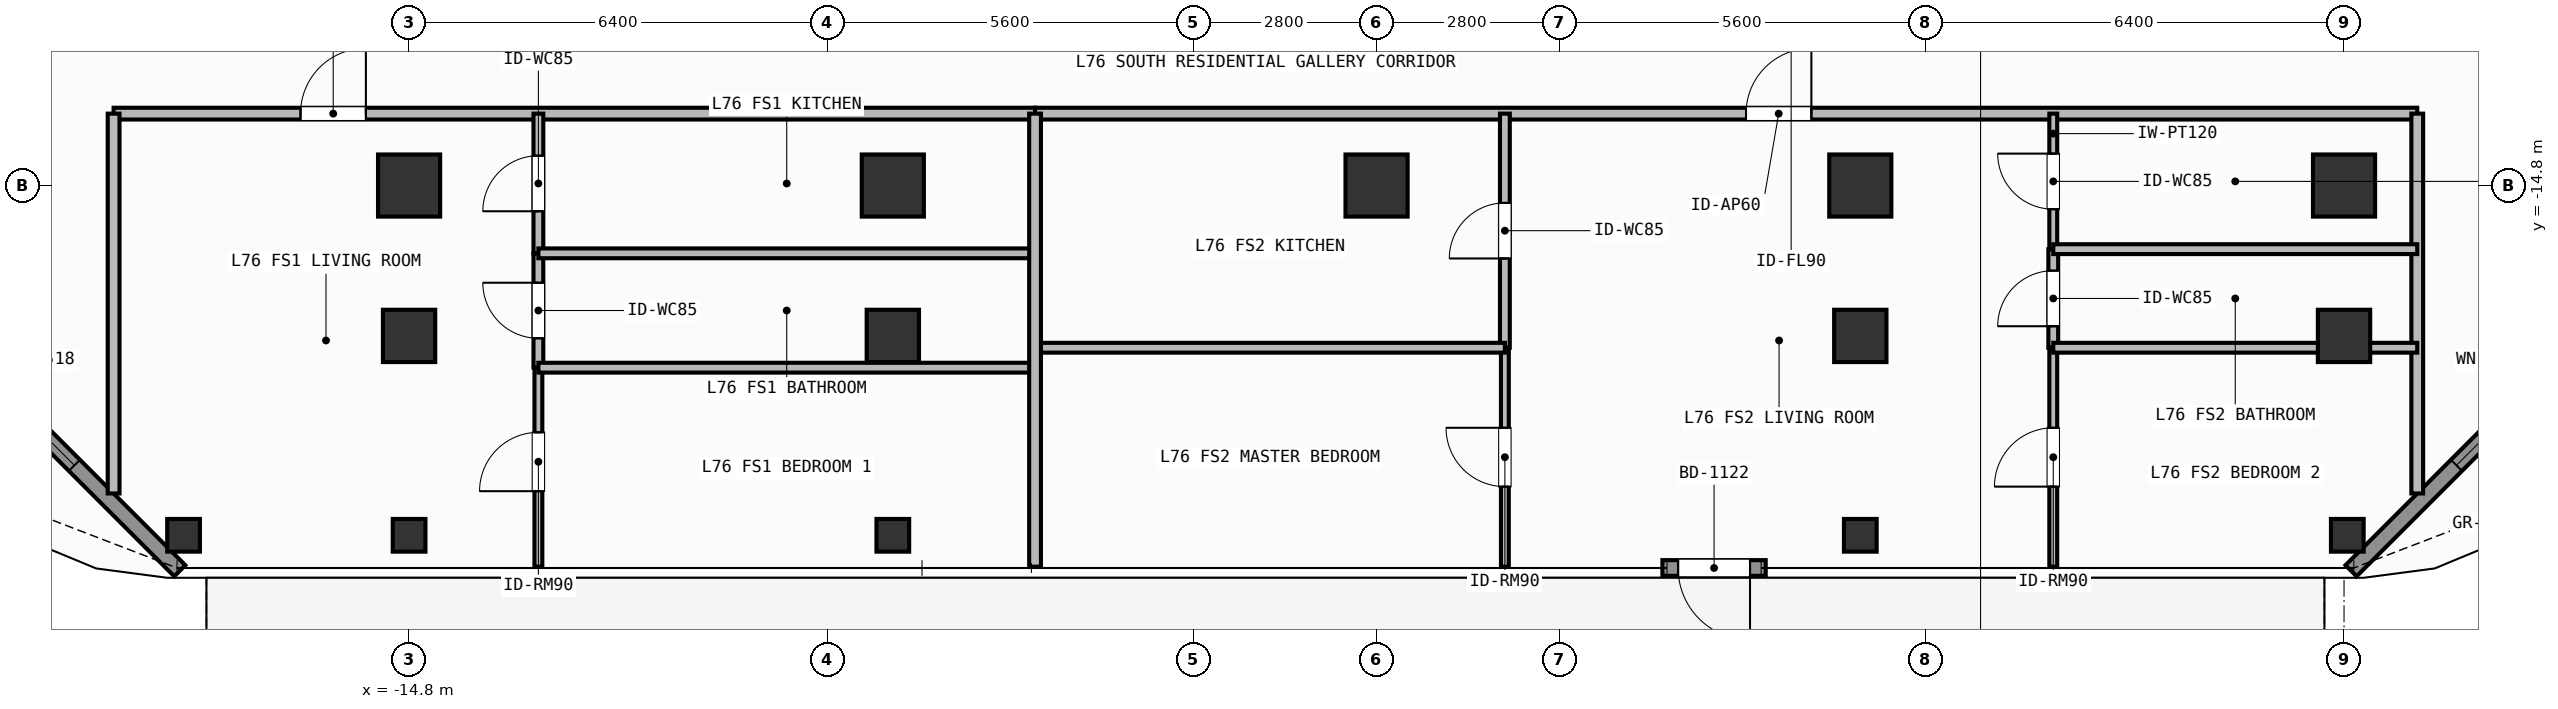
"""IFC4 building model, lengths in metres.
Left out: names, types, materials, properties, quantities, classifications, styles, units other than length and angle.
Written with IfcOpenShell. Run it as: python <this file> out.ifc"""

import sys

from ifc_helpers import new_model, si_unit, direction, frame, frame_2d, origin, origin_2d, place, context, subcontext, project, spatial, rectangle, hollow_rectangle, extrude, element, fill, save


model = new_model("IFC4")
c1 = context("Model", 3, precision=1e-05, world=origin(), true_north=direction((0.0, 1.0)))
c2 = subcontext(c1, "Body", "Model", "MODEL_VIEW")
j1 = project(units=[si_unit("LENGTHUNIT", "METRE"), si_unit("PLANEANGLEUNIT", "RADIAN")], contexts=[c1])
p1 = place(None, origin())
s1 = spatial("IfcSite", under=j1, at=p1, CompositionType="ELEMENT")
p2 = place(p1, origin())
s2 = spatial("IfcBuilding", under=s1, at=p2, CompositionType="ELEMENT")
p3 = place(p2, frame((0.0, 0.0, 309.3)))
s3 = spatial("IfcBuildingStorey", under=s2, at=p3, CompositionType="ELEMENT", Elevation=309.3)
for number, where, z_axis, x_axis in (
    (1, (-14.8, -14.8, 0.0), (0.0, 0.0, 1.0), (1.0, 0.0, 0.0)),
    (2, (-7.4, -14.8, 0.0), (0.0, 0.0, 1.0), (1.0, 0.0, 0.0)),
    (3, (0.0, -14.8, 0.0), (0.0, 0.0, 1.0), (1.0, 0.0, 0.0)),
    (4, (7.4, -14.8, 0.0), (0.0, 0.0, 1.0), (1.0, 0.0, 0.0)),
    (5, (14.8, -14.8, 0.0), (0.0, 0.0, 1.0), (1.0, 0.0, 0.0)),
):
    element("IfcColumn", number, at=place(p3, frame(where, z_axis=z_axis, x_axis=x_axis)), inside=s3, PredefinedType="COLUMN", context=c2, shape_type="SweptSolid", body=[
        extrude(rectangle(XDim=0.95, YDim=0.95, at=origin_2d()), origin(), (0.0, 0.0, 1.0), 3.9),
    ])
for number, where, z_axis, x_axis in (
    (6, (-14.8, -17.1, 0.0), (0.0, 0.0, 1.0), (1.0, 0.0, 0.0)),
    (7, (-7.4, -17.1, 0.0), (0.0, 0.0, 1.0), (1.0, 0.0, 0.0)),
    (8, (7.4, -17.1, 0.0), (0.0, 0.0, 1.0), (1.0, 0.0, 0.0)),
    (9, (14.8, -17.1, 0.0), (0.0, 0.0, 1.0), (1.0, 0.0, 0.0)),
):
    element("IfcColumn", number, at=place(p3, frame(where, z_axis=z_axis, x_axis=x_axis)), inside=s3, PredefinedType="COLUMN", context=c2, shape_type="SweptSolid", body=[
        extrude(hollow_rectangle(XDim=0.8, YDim=0.8, WallThickness=0.036, at=origin_2d()), origin(), (0.0, 0.0, 1.0), 3.9),
    ])
for number, where, z_axis, x_axis in (
    (10, (-18.25, -20.15, 0.0), (0.0, 0.0, 1.0), (1.0, 0.0, 0.0)),
    (11, (14.85, -20.15, 0.0), (0.0, 0.0, 1.0), (1.0, 0.0, 0.0)),
    (12, (-14.8, -20.15, 0.0), (0.0, 0.0, 1.0), (1.0, 0.0, 0.0)),
    (13, (-7.4, -20.15, 0.0), (0.0, 0.0, 1.0), (1.0, 0.0, 0.0)),
    (14, (7.4, -20.15, 0.0), (0.0, 0.0, 1.0), (1.0, 0.0, 0.0)),
):
    element("IfcColumn", number, at=place(p3, frame(where, z_axis=z_axis, x_axis=x_axis)), inside=s3, PredefinedType="COLUMN", context=c2, shape_type="SweptSolid", body=[
        extrude(hollow_rectangle(XDim=0.5, YDim=0.5, WallThickness=0.025, at=origin_2d()), origin(), (0.0, 0.0, 1.0), 3.9),
    ])
p4 = place(p3, frame((5.953, -20.65, 0.0), z_axis=(0.0, 0.0, 1.0), x_axis=(-1.0, 0.0, 0.0)))
e15 = element("IfcWall", 15, at=p4, inside=s3, PredefinedType="SOLIDWALL", context=c2, shape_type="SweptSolid", body=[
    extrude(rectangle(XDim=1.58, YDim=0.24, at=frame_2d((0.79, 0.0))), origin(), (0.0, 0.0, 1.0), 3.64),
])
p5 = place(p4, frame((0.24, 0.0, 0.0)))
e16 = element("IfcOpeningElement", 16, at=p5, cuts=e15, PredefinedType="OPENING", context=c2, shape_type="SweptSolid", body=[
    extrude(rectangle(XDim=1.1, YDim=2.2, at=frame_2d((0.55, 1.1))), frame((0.0, 0.13, 0.0), z_axis=(0.0, -1.0, 0.0), x_axis=(1.0, 0.0, 0.0)), (0.0, 0.0, 1.0), 0.26),
])
p6 = place(p3, frame((-18.308, -20.692, 0.0), z_axis=(0.0, 0.0, 1.0), x_axis=(-0.707106781187, 0.707106781187, 0.0)))
e17 = element("IfcWall", 17, at=p6, inside=s3, PredefinedType="SOLIDWALL", context=c2, shape_type="SweptSolid", body=[
    extrude(rectangle(XDim=6.059, YDim=0.24, at=frame_2d((3.03, 0.0))), origin(), (0.0, 0.0, 1.0), 3.64),
])
p7 = place(p6, frame((2.28, 0.0, 0.8)))
e18 = element("IfcOpeningElement", 18, at=p7, cuts=e17, PredefinedType="OPENING", context=c2, shape_type="SweptSolid", body=[
    extrude(rectangle(XDim=1.5, YDim=1.85, at=frame_2d((0.75, 0.925))), frame((0.0, 0.13, 0.0), z_axis=(0.0, -1.0, 0.0), x_axis=(1.0, 0.0, 0.0)), (0.0, 0.0, 1.0), 0.26),
])
p8 = place(p3, frame((19.192, -16.408, 0.0), z_axis=(0.0, 0.0, 1.0), x_axis=(-0.707106781187, -0.707106781187, 0.0)))
e19 = element("IfcWall", 19, at=p8, inside=s3, PredefinedType="SOLIDWALL", context=c2, shape_type="SweptSolid", body=[
    extrude(rectangle(XDim=6.059, YDim=0.24, at=frame_2d((3.03, 0.0))), origin(), (0.0, 0.0, 1.0), 3.64),
])
p9 = place(p8, frame((2.28, 0.0, 0.8)))
e20 = element("IfcOpeningElement", 20, at=p9, cuts=e19, PredefinedType="OPENING", context=c2, shape_type="SweptSolid", body=[
    extrude(rectangle(XDim=1.5, YDim=1.85, at=frame_2d((0.75, 0.925))), frame((0.0, 0.13, 0.0), z_axis=(0.0, -1.0, 0.0), x_axis=(1.0, 0.0, 0.0)), (0.0, 0.0, 1.0), 0.26),
])
p10 = place(p3, frame((-19.32, -13.7, 0.0), z_axis=(0.0, 0.0, 1.0), x_axis=(1.0, 0.0, 0.0)))
e21 = element("IfcWall", 21, at=p10, inside=s3, PredefinedType="PARTITIONING", context=c2, shape_type="SweptSolid", body=[
    extrude(rectangle(XDim=14.096, YDim=0.18, at=frame_2d((7.048, 0.0))), origin(), (0.0, 0.0, 1.0), 3.64),
])
p11 = place(p10, frame((2.859, 0.0, 0.0)))
e22 = element("IfcOpeningElement", 22, at=p11, cuts=e21, PredefinedType="OPENING", context=c2, shape_type="SweptSolid", body=[
    extrude(rectangle(XDim=1.0, YDim=2.2, at=frame_2d((0.5, 1.1))), frame((0.0, 0.1, 0.0), z_axis=(0.0, -1.0, 0.0), x_axis=(1.0, 0.0, 0.0)), (0.0, 0.0, 1.0), 0.2),
])
p12 = place(p3, frame((-12.822, -15.837, 0.0), z_axis=(0.0, 0.0, 1.0), x_axis=(0.0, 1.0, 0.0)))
e23 = element("IfcWall", 23, at=p12, inside=s3, PredefinedType="PARTITIONING", context=c2, shape_type="SweptSolid", body=[
    extrude(rectangle(XDim=2.137, YDim=0.15, at=frame_2d((1.068, 0.0))), origin(), (0.0, 0.0, 1.0), 3.64),
])
p13 = place(p12, frame((0.644, 0.0, 0.0)))
e24 = element("IfcOpeningElement", 24, at=p13, cuts=e23, PredefinedType="OPENING", context=c2, shape_type="SweptSolid", body=[
    extrude(rectangle(XDim=0.85, YDim=2.1, at=frame_2d((0.425, 1.05))), frame((0.0, 0.085, 0.0), z_axis=(0.0, -1.0, 0.0), x_axis=(1.0, 0.0, 0.0)), (0.0, 0.0, 1.0), 0.17),
])
p14 = place(p3, frame((-12.822, -17.586, 0.0), z_axis=(0.0, 0.0, 1.0), x_axis=(0.0, 1.0, 0.0)))
e25 = element("IfcWall", 25, at=p14, inside=s3, PredefinedType="PARTITIONING", context=c2, shape_type="SweptSolid", body=[
    extrude(rectangle(XDim=1.749, YDim=0.15, at=frame_2d((0.875, 0.0))), origin(), (0.0, 0.0, 1.0), 3.64),
])
p15 = place(p14, frame((0.449, 0.0, 0.0)))
e26 = element("IfcOpeningElement", 26, at=p15, cuts=e25, PredefinedType="OPENING", context=c2, shape_type="SweptSolid", body=[
    extrude(rectangle(XDim=0.85, YDim=2.1, at=frame_2d((0.425, 1.05))), frame((0.0, 0.085, 0.0), z_axis=(0.0, -1.0, 0.0), x_axis=(1.0, 0.0, 0.0)), (0.0, 0.0, 1.0), 0.17),
])
p16 = place(p3, frame((-12.822, -20.63, 0.0), z_axis=(0.0, 0.0, 1.0), x_axis=(0.0, 1.0, 0.0)))
e27 = element("IfcWall", 27, at=p16, inside=s3, PredefinedType="PARTITIONING", context=c2, shape_type="SweptSolid", body=[
    extrude(rectangle(XDim=3.044, YDim=0.12, at=frame_2d((1.522, 0.0))), origin(), (0.0, 0.0, 1.0), 3.64),
])
p17 = place(p16, frame((1.155, 0.0, 0.0)))
e28 = element("IfcOpeningElement", 28, at=p17, cuts=e27, PredefinedType="OPENING", context=c2, shape_type="SweptSolid", body=[
    extrude(rectangle(XDim=0.9, YDim=2.1, at=frame_2d((0.45, 1.05))), frame((0.0, 0.07, 0.0), z_axis=(0.0, -1.0, 0.0), x_axis=(1.0, 0.0, 0.0)), (0.0, 0.0, 1.0), 0.14),
])
p18 = place(p3, frame((-5.224, -13.7, 0.0), z_axis=(0.0, 0.0, 1.0), x_axis=(1.0, 0.0, 0.0)))
e29 = element("IfcWall", 29, at=p18, inside=s3, PredefinedType="PARTITIONING", context=c2, shape_type="SweptSolid", body=[
    extrude(rectangle(XDim=21.144, YDim=0.18, at=frame_2d((10.572, 0.0))), origin(), (0.0, 0.0, 1.0), 3.64),
])
p19 = place(p18, frame((10.876, 0.0, 0.0)))
e30 = element("IfcOpeningElement", 30, at=p19, cuts=e29, PredefinedType="OPENING", context=c2, shape_type="SweptSolid", body=[
    extrude(rectangle(XDim=1.0, YDim=2.2, at=frame_2d((0.5, 1.1))), frame((0.0, 0.1, 0.0), z_axis=(0.0, -1.0, 0.0), x_axis=(1.0, 0.0, 0.0)), (0.0, 0.0, 1.0), 0.2),
])
p20 = place(p3, frame((1.963, -17.281, 0.0), z_axis=(0.0, 0.0, 1.0), x_axis=(0.0, 1.0, 0.0)))
e31 = element("IfcWall", 31, at=p20, inside=s3, PredefinedType="PARTITIONING", context=c2, shape_type="SweptSolid", body=[
    extrude(rectangle(XDim=3.581, YDim=0.15, at=frame_2d((1.791, 0.0))), origin(), (0.0, 0.0, 1.0), 3.64),
])
p21 = place(p20, frame((1.365, 0.0, 0.0)))
e32 = element("IfcOpeningElement", 32, at=p21, cuts=e31, PredefinedType="OPENING", context=c2, shape_type="SweptSolid", body=[
    extrude(rectangle(XDim=0.85, YDim=2.1, at=frame_2d((0.425, 1.05))), frame((0.0, 0.085, 0.0), z_axis=(0.0, -1.0, 0.0), x_axis=(1.0, 0.0, 0.0)), (0.0, 0.0, 1.0), 0.17),
])
p22 = place(p3, frame((1.963, -20.63, 0.0), z_axis=(0.0, 0.0, 1.0), x_axis=(0.0, 1.0, 0.0)))
e33 = element("IfcWall", 33, at=p22, inside=s3, PredefinedType="PARTITIONING", context=c2, shape_type="SweptSolid", body=[
    extrude(rectangle(XDim=3.349, YDim=0.12, at=frame_2d((1.674, 0.0))), origin(), (0.0, 0.0, 1.0), 3.64),
])
p23 = place(p22, frame((1.225, 0.0, 0.0)))
e34 = element("IfcOpeningElement", 34, at=p23, cuts=e33, PredefinedType="OPENING", context=c2, shape_type="SweptSolid", body=[
    extrude(rectangle(XDim=0.9, YDim=2.1, at=frame_2d((0.45, 1.05))), frame((0.0, 0.07, 0.0), z_axis=(0.0, -1.0, 0.0), x_axis=(1.0, 0.0, 0.0)), (0.0, 0.0, 1.0), 0.14),
])
p24 = place(p3, frame((10.352, -17.281, 0.0), z_axis=(0.0, 0.0, 1.0), x_axis=(0.0, 1.0, 0.0)))
e35 = element("IfcWall", 35, at=p24, inside=s3, PredefinedType="PARTITIONING", context=c2, shape_type="SweptSolid", body=[
    extrude(rectangle(XDim=1.508, YDim=0.15, at=frame_2d((0.754, 0.0))), origin(), (0.0, 0.0, 1.0), 3.64),
])
p25 = place(p24, frame((0.329, 0.0, 0.0)))
e36 = element("IfcOpeningElement", 36, at=p25, cuts=e35, PredefinedType="OPENING", context=c2, shape_type="SweptSolid", body=[
    extrude(rectangle(XDim=0.85, YDim=2.1, at=frame_2d((0.425, 1.05))), frame((0.0, 0.085, 0.0), z_axis=(0.0, -1.0, 0.0), x_axis=(1.0, 0.0, 0.0)), (0.0, 0.0, 1.0), 0.17),
])
p26 = place(p3, frame((10.352, -15.773, 0.0), z_axis=(0.0, 0.0, 1.0), x_axis=(0.0, 1.0, 0.0)))
e37 = element("IfcWall", 37, at=p26, inside=s3, PredefinedType="PARTITIONING", context=c2, shape_type="SweptSolid", body=[
    extrude(rectangle(XDim=2.073, YDim=0.12, at=frame_2d((1.037, 0.0))), origin(), (0.0, 0.0, 1.0), 3.64),
])
p27 = place(p26, frame((0.612, 0.0, 0.0)))
e38 = element("IfcOpeningElement", 38, at=p27, cuts=e37, PredefinedType="OPENING", context=c2, shape_type="SweptSolid", body=[
    extrude(rectangle(XDim=0.85, YDim=2.1, at=frame_2d((0.425, 1.05))), frame((0.0, 0.07, 0.0), z_axis=(0.0, -1.0, 0.0), x_axis=(1.0, 0.0, 0.0)), (0.0, 0.0, 1.0), 0.14),
])
p28 = place(p3, frame((10.352, -20.63, 0.0), z_axis=(0.0, 0.0, 1.0), x_axis=(0.0, 1.0, 0.0)))
e39 = element("IfcWall", 39, at=p28, inside=s3, PredefinedType="PARTITIONING", context=c2, shape_type="SweptSolid", body=[
    extrude(rectangle(XDim=3.349, YDim=0.12, at=frame_2d((1.674, 0.0))), origin(), (0.0, 0.0, 1.0), 3.64),
])
p29 = place(p28, frame((1.225, 0.0, 0.0)))
e40 = element("IfcOpeningElement", 40, at=p29, cuts=e39, PredefinedType="OPENING", context=c2, shape_type="SweptSolid", body=[
    extrude(rectangle(XDim=0.9, YDim=2.1, at=frame_2d((0.45, 1.05))), frame((0.0, 0.07, 0.0), z_axis=(0.0, -1.0, 0.0), x_axis=(1.0, 0.0, 0.0)), (0.0, 0.0, 1.0), 0.14),
])
for number, where, z_axis, x_axis in (
    (41, (-19.32, -19.51, 0.0), (0.0, 0.0, 1.0), (0.0, 1.0, 0.0)),
    (42, (15.92, -19.51, 0.0), (0.0, 0.0, 1.0), (0.0, 1.0, 0.0)),
):
    element("IfcWall", number, at=place(p3, frame(where, z_axis=z_axis, x_axis=x_axis)), inside=s3, PredefinedType="PARTITIONING", context=c2, shape_type="SweptSolid", body=[
        extrude(rectangle(XDim=5.81, YDim=0.18, at=frame_2d((2.905, 0.0))), origin(), (0.0, 0.0, 1.0), 3.33),
    ])
for number, where, z_axis, x_axis in (
    (43, (-12.822, -15.837, 0.0), (0.0, 0.0, 1.0), (1.0, 0.0, 0.0)),
    (44, (-12.822, -17.586, 0.0), (0.0, 0.0, 1.0), (1.0, 0.0, 0.0)),
):
    element("IfcWall", number, at=place(p3, frame(where, z_axis=z_axis, x_axis=x_axis)), inside=s3, PredefinedType="PARTITIONING", context=c2, shape_type="SweptSolid", body=[
        extrude(rectangle(XDim=7.598, YDim=0.15, at=frame_2d((3.799, 0.0))), origin(), (0.0, 0.0, 1.0), 3.64),
    ])
p30 = place(p3, frame((-5.224, -17.281, 0.0), z_axis=(0.0, 0.0, 1.0), x_axis=(1.0, 0.0, 0.0)))
e45 = element("IfcWall", 45, at=p30, inside=s3, PredefinedType="PARTITIONING", context=c2, shape_type="SweptSolid", body=[
    extrude(rectangle(XDim=7.187, YDim=0.15, at=frame_2d((3.594, 0.0))), origin(), (0.0, 0.0, 1.0), 3.33),
])
p31 = place(p3, frame((10.352, -15.773, 0.0), z_axis=(0.0, 0.0, 1.0), x_axis=(1.0, 0.0, 0.0)))
e46 = element("IfcWall", 46, at=p31, inside=s3, PredefinedType="PARTITIONING", context=c2, shape_type="SweptSolid", body=[
    extrude(rectangle(XDim=5.568, YDim=0.15, at=frame_2d((2.784, 0.0))), origin(), (0.0, 0.0, 1.0), 3.64),
])
p32 = place(p3, frame((10.352, -17.281, 0.0), z_axis=(0.0, 0.0, 1.0), x_axis=(1.0, 0.0, 0.0)))
e47 = element("IfcWall", 47, at=p32, inside=s3, PredefinedType="PARTITIONING", context=c2, shape_type="SweptSolid", body=[
    extrude(rectangle(XDim=5.568, YDim=0.15, at=frame_2d((2.784, 0.0))), origin(), (0.0, 0.0, 1.0), 3.33),
])
p33 = place(p3, frame((-5.224, -20.63, 0.0), z_axis=(0.0, 0.0, 1.0), x_axis=(0.0, 1.0, 0.0)))
e48 = element("IfcWall", 48, at=p33, inside=s3, PredefinedType="PARTITIONING", context=c2, shape_type="SweptSolid", body=[
    extrude(rectangle(XDim=6.93, YDim=0.18, at=frame_2d((3.465, 0.0))), origin(), (0.0, 0.0, 1.0), 3.64),
])
p34 = place(p5, origin())
e49 = element("IfcDoor", 49, at=p34, inside=s3, OperationType="SINGLE_SWING_LEFT", PredefinedType="DOOR", context=c2, shape_type="SweptSolid", body=[
    extrude(rectangle(XDim=1.1, YDim=2.2, at=frame_2d((0.55, 1.1))), frame((0.0, 0.025, 0.0), z_axis=(0.0, -1.0, 0.0), x_axis=(1.0, 0.0, 0.0)), (0.0, 0.0, 1.0), 0.05),
])
fill(e16, e49)
p35 = place(p7, origin())
e50 = element("IfcWindow", 50, at=p35, inside=s3, PartitioningType="SINGLE_PANEL", PredefinedType="WINDOW", context=c2, shape_type="SweptSolid", body=[
    extrude(rectangle(XDim=1.5, YDim=1.85, at=frame_2d((0.75, 0.925))), frame((0.0, 0.03, 0.0), z_axis=(0.0, -1.0, 0.0), x_axis=(1.0, 0.0, 0.0)), (0.0, 0.0, 1.0), 0.06),
])
fill(e18, e50)
p36 = place(p9, origin())
e51 = element("IfcWindow", 51, at=p36, inside=s3, PartitioningType="SINGLE_PANEL", PredefinedType="WINDOW", context=c2, shape_type="SweptSolid", body=[
    extrude(rectangle(XDim=1.5, YDim=1.85, at=frame_2d((0.75, 0.925))), frame((0.0, 0.03, 0.0), z_axis=(0.0, -1.0, 0.0), x_axis=(1.0, 0.0, 0.0)), (0.0, 0.0, 1.0), 0.06),
])
fill(e20, e51)
p37 = place(p11, origin())
e52 = element("IfcDoor", 52, at=p37, inside=s3, OperationType="SINGLE_SWING_RIGHT", PredefinedType="DOOR", context=c2, shape_type="SweptSolid", body=[
    extrude(rectangle(XDim=1.0, YDim=2.2, at=frame_2d((0.5, 1.1))), frame((0.0, 0.025, 0.0), z_axis=(0.0, -1.0, 0.0), x_axis=(1.0, 0.0, 0.0)), (0.0, 0.0, 1.0), 0.05),
])
fill(e22, e52)
p38 = place(p13, origin())
e53 = element("IfcDoor", 53, at=p38, inside=s3, OperationType="SINGLE_SWING_LEFT", PredefinedType="DOOR", context=c2, shape_type="SweptSolid", body=[
    extrude(rectangle(XDim=0.85, YDim=2.1, at=frame_2d((0.425, 1.05))), frame((0.0, 0.025, 0.0), z_axis=(0.0, -1.0, 0.0), x_axis=(1.0, 0.0, 0.0)), (0.0, 0.0, 1.0), 0.05),
])
fill(e24, e53)
p39 = place(p15, origin())
e54 = element("IfcDoor", 54, at=p39, inside=s3, OperationType="SINGLE_SWING_RIGHT", PredefinedType="DOOR", context=c2, shape_type="SweptSolid", body=[
    extrude(rectangle(XDim=0.85, YDim=2.1, at=frame_2d((0.425, 1.05))), frame((0.0, 0.025, 0.0), z_axis=(0.0, -1.0, 0.0), x_axis=(1.0, 0.0, 0.0)), (0.0, 0.0, 1.0), 0.05),
])
fill(e26, e54)
p40 = place(p17, origin())
e55 = element("IfcDoor", 55, at=p40, inside=s3, OperationType="SINGLE_SWING_LEFT", PredefinedType="DOOR", context=c2, shape_type="SweptSolid", body=[
    extrude(rectangle(XDim=0.9, YDim=2.1, at=frame_2d((0.45, 1.05))), frame((0.0, 0.025, 0.0), z_axis=(0.0, -1.0, 0.0), x_axis=(1.0, 0.0, 0.0)), (0.0, 0.0, 1.0), 0.05),
])
fill(e28, e55)
p41 = place(p19, origin())
e56 = element("IfcDoor", 56, at=p41, inside=s3, OperationType="SINGLE_SWING_RIGHT", PredefinedType="DOOR", context=c2, shape_type="SweptSolid", body=[
    extrude(rectangle(XDim=1.0, YDim=2.2, at=frame_2d((0.5, 1.1))), frame((0.0, 0.025, 0.0), z_axis=(0.0, -1.0, 0.0), x_axis=(1.0, 0.0, 0.0)), (0.0, 0.0, 1.0), 0.05),
])
fill(e30, e56)
p42 = place(p21, origin())
e57 = element("IfcDoor", 57, at=p42, inside=s3, OperationType="SINGLE_SWING_LEFT", PredefinedType="DOOR", context=c2, shape_type="SweptSolid", body=[
    extrude(rectangle(XDim=0.85, YDim=2.1, at=frame_2d((0.425, 1.05))), frame((0.0, 0.025, 0.0), z_axis=(0.0, -1.0, 0.0), x_axis=(1.0, 0.0, 0.0)), (0.0, 0.0, 1.0), 0.05),
])
fill(e32, e57)
p43 = place(p23, origin())
e58 = element("IfcDoor", 58, at=p43, inside=s3, OperationType="SINGLE_SWING_RIGHT", PredefinedType="DOOR", context=c2, shape_type="SweptSolid", body=[
    extrude(rectangle(XDim=0.9, YDim=2.1, at=frame_2d((0.45, 1.05))), frame((0.0, 0.025, 0.0), z_axis=(0.0, -1.0, 0.0), x_axis=(1.0, 0.0, 0.0)), (0.0, 0.0, 1.0), 0.05),
])
fill(e34, e58)
p44 = place(p25, origin())
e59 = element("IfcDoor", 59, at=p44, inside=s3, OperationType="SINGLE_SWING_LEFT", PredefinedType="DOOR", context=c2, shape_type="SweptSolid", body=[
    extrude(rectangle(XDim=0.85, YDim=2.1, at=frame_2d((0.425, 1.05))), frame((0.0, 0.025, 0.0), z_axis=(0.0, -1.0, 0.0), x_axis=(1.0, 0.0, 0.0)), (0.0, 0.0, 1.0), 0.05),
])
fill(e36, e59)
p45 = place(p27, origin())
e60 = element("IfcDoor", 60, at=p45, inside=s3, OperationType="SINGLE_SWING_RIGHT", PredefinedType="DOOR", context=c2, shape_type="SweptSolid", body=[
    extrude(rectangle(XDim=0.85, YDim=2.1, at=frame_2d((0.425, 1.05))), frame((0.0, 0.025, 0.0), z_axis=(0.0, -1.0, 0.0), x_axis=(1.0, 0.0, 0.0)), (0.0, 0.0, 1.0), 0.05),
])
fill(e38, e60)
p46 = place(p29, origin())
e61 = element("IfcDoor", 61, at=p46, inside=s3, OperationType="SINGLE_SWING_LEFT", PredefinedType="DOOR", context=c2, shape_type="SweptSolid", body=[
    extrude(rectangle(XDim=0.9, YDim=2.1, at=frame_2d((0.45, 1.05))), frame((0.0, 0.025, 0.0), z_axis=(0.0, -1.0, 0.0), x_axis=(1.0, 0.0, 0.0)), (0.0, 0.0, 1.0), 0.05),
])
fill(e40, e61)
save(model, sys.argv[1])
